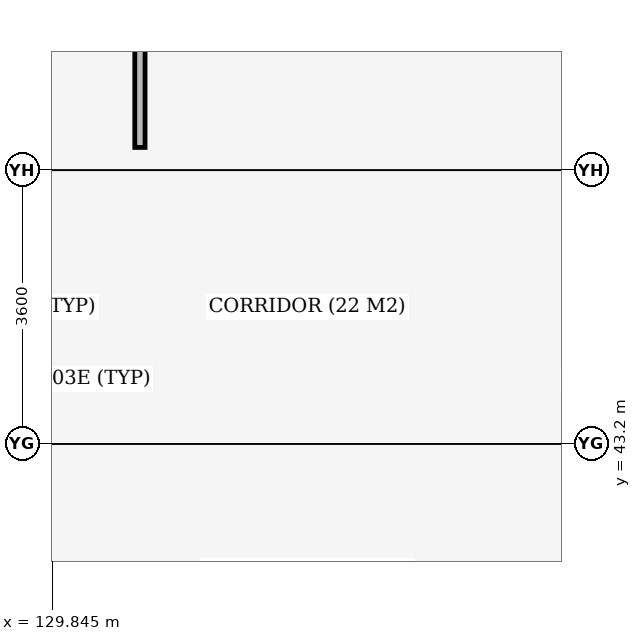
"""IFC4 building model, lengths in metres.
Left out: names, types, materials, properties, quantities, classifications, styles, units other than length and angle.
Written with IfcOpenShell. Run it as: python <this file> out.ifc"""

import sys

from ifc_helpers import new_model, si_unit, direction, frame, frame_2d, origin, place, context, subcontext, project, spatial, rectangle, extrude, element, save


model = new_model("IFC4")
c1 = context("Model", 3, precision=1e-05, world=origin(), true_north=direction((0.0, 1.0)))
c2 = subcontext(c1, "Body", "Model", "MODEL_VIEW")
j1 = project(units=[si_unit("LENGTHUNIT", "METRE"), si_unit("PLANEANGLEUNIT", "RADIAN")], contexts=[c1])
p1 = place(None, origin())
s1 = spatial("IfcSite", under=j1, at=p1, CompositionType="ELEMENT")
p2 = place(p1, origin())
s2 = spatial("IfcBuilding", under=s1, at=p2, CompositionType="ELEMENT")
p3 = place(p2, frame((0.0, 0.0, 13.8)))
s3 = spatial("IfcBuildingStorey", under=s2, at=p3, CompositionType="ELEMENT", Elevation=13.8)
p4 = place(p3, frame((131.0, 47.1, 0.0), z_axis=(0.0, 0.0, 1.0), x_axis=(0.0, 1.0, 0.0)))
e1 = element("IfcWall", 1, at=p4, inside=s3, PredefinedType="PARTITIONING", context=c2, shape_type="SweptSolid", body=[
    extrude(rectangle(XDim=8.9, YDim=0.135, at=frame_2d((4.45, 0.0))), origin(), (0.0, 0.0, 1.0), 3.935),
])
p5 = place(p4, frame((3.87, 0.0, 0.0)))
e2 = element("IfcOpeningElement", 2, at=p5, cuts=e1, PredefinedType="OPENING", context=c2, shape_type="SweptSolid", body=[
    extrude(rectangle(XDim=1.16, YDim=2.2, at=frame_2d((0.58, 1.1))), frame((0.0, 0.077, 0.0), z_axis=(0.0, -1.0, 0.0), x_axis=(1.0, 0.0, 0.0)), (0.0, 0.0, 1.0), 0.155),
])
save(model, sys.argv[1])
